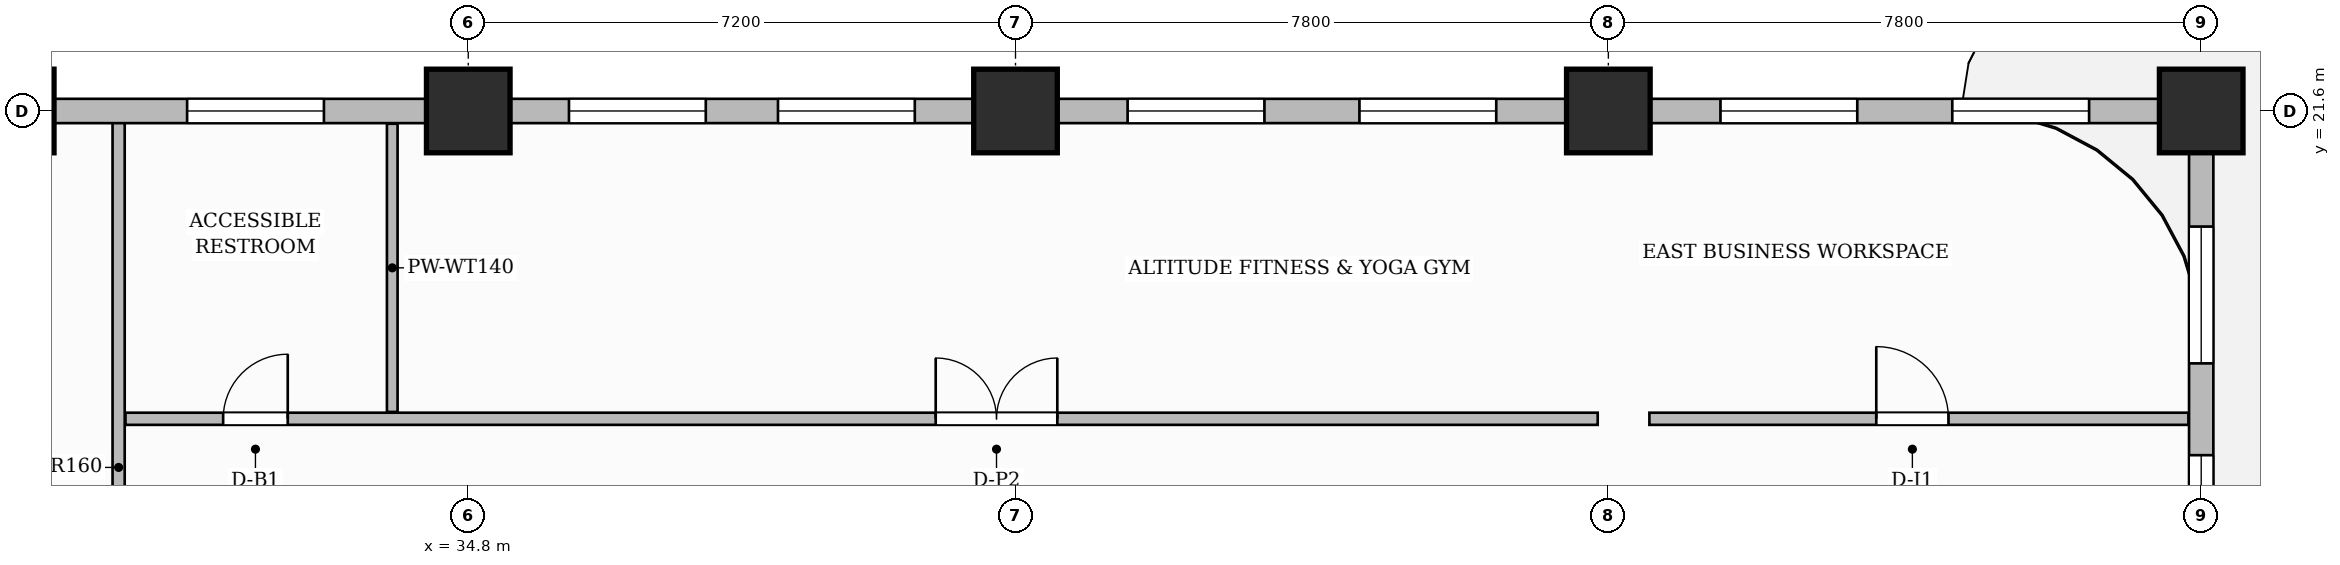
"""IFC4 building model, lengths in metres.
Left out: names, types, materials, properties, quantities, classifications, styles, units other than length and angle.
Written with IfcOpenShell. Run it as: python <this file> out.ifc"""

import sys

from ifc_helpers import new_model, si_unit, direction, frame, frame_2d, origin, origin_2d, place, context, subcontext, project, spatial, rectangle, extrude, source, transform, mapped, element, fill, save


model = new_model("IFC4")
c1 = context("Model", 3, precision=1e-05, world=origin(), true_north=direction((0.0, 1.0)))
c2 = subcontext(c1, "Body", "Model", "MODEL_VIEW")
j1 = project(units=[si_unit("LENGTHUNIT", "METRE"), si_unit("PLANEANGLEUNIT", "RADIAN")], contexts=[c1])
p1 = place(None, origin())
s1 = spatial("IfcSite", under=j1, at=p1, CompositionType="ELEMENT")
p2 = place(p1, origin())
s2 = spatial("IfcBuilding", under=s1, at=p2, CompositionType="ELEMENT")
p3 = place(p2, frame((0.0, 0.0, 54.6)))
s3 = spatial("IfcBuildingStorey", under=s2, at=p3, CompositionType="ELEMENT", Elevation=54.6)
m1 = source(origin(), c2, "Body", "SweptSolid", [
    extrude(rectangle(XDim=1.1, YDim=1.1, at=origin_2d()), origin(), (0.0, 0.0, 1.0), 3.7),
])
for number, where, z_axis, x_axis in (
    (1, (28.8, 21.6, 0.0), (0.0, 0.0, 1.0), (1.0, 0.0, 0.0)),
    (2, (34.8, 21.6, 0.0), (0.0, 0.0, 1.0), (1.0, 0.0, 0.0)),
    (3, (42.0, 21.6, 0.0), (0.0, 0.0, 1.0), (1.0, 0.0, 0.0)),
    (4, (49.8, 21.6, 0.0), (0.0, 0.0, 1.0), (1.0, 0.0, 0.0)),
    (5, (57.6, 21.6, 0.0), (0.0, 0.0, 1.0), (1.0, 0.0, 0.0)),
):
    element("IfcColumn", number, at=place(p3, frame(where, z_axis=z_axis, x_axis=x_axis)), inside=s3, PredefinedType="COLUMN", context=c2, shape_type="MappedRepresentation", body=[
        mapped(m1, transform((0.0, 0.0, 0.0), scale=1.0)),
    ])
p4 = place(p3, frame((30.2, 12.36, 0.0), z_axis=(0.0, 0.0, 1.0), x_axis=(0.0, 1.0, 0.0)))
e6 = element("IfcWall", 6, at=p4, inside=s3, PredefinedType="PARTITIONING", context=c2, shape_type="SweptSolid", body=[
    extrude(rectangle(XDim=9.1, YDim=0.16, at=frame_2d((4.55, 0.0))), origin(), (0.0, 0.0, 1.0), 3.45),
])
p5 = place(p3, frame((30.29, 17.55, 0.0), z_axis=(0.0, 0.0, 1.0), x_axis=(1.0, 0.0, 0.0)))
e7 = element("IfcWall", 7, at=p5, inside=s3, PredefinedType="PARTITIONING", context=c2, shape_type="SweptSolid", body=[
    extrude(rectangle(XDim=19.37, YDim=0.16, at=frame_2d((9.685, 0.0))), origin(), (0.0, 0.0, 1.0), 3.45),
])
p6 = place(p5, frame((1.285, 0.0, 0.0)))
e8 = element("IfcOpeningElement", 8, at=p6, cuts=e7, PredefinedType="OPENING", context=c2, shape_type="SweptSolid", body=[
    extrude(rectangle(XDim=0.85, YDim=2.1, at=frame_2d((0.425, 1.05))), frame((0.0, 0.09, 0.0), z_axis=(0.0, -1.0, 0.0), x_axis=(1.0, 0.0, 0.0)), (0.0, 0.0, 1.0), 0.18),
])
p7 = place(p5, frame((10.66, 0.0, 0.0)))
e9 = element("IfcOpeningElement", 9, at=p7, cuts=e7, PredefinedType="OPENING", context=c2, shape_type="SweptSolid", body=[
    extrude(rectangle(XDim=1.6, YDim=2.4, at=frame_2d((0.8, 1.2))), frame((0.0, 0.09, 0.0), z_axis=(0.0, -1.0, 0.0), x_axis=(1.0, 0.0, 0.0)), (0.0, 0.0, 1.0), 0.18),
])
p8 = place(p3, frame((50.34, 17.55, 0.0), z_axis=(0.0, 0.0, 1.0), x_axis=(1.0, 0.0, 0.0)))
e10 = element("IfcWall", 10, at=p8, inside=s3, PredefinedType="PARTITIONING", context=c2, shape_type="SweptSolid", body=[
    extrude(rectangle(XDim=7.092, YDim=0.16, at=frame_2d((3.546, 0.0))), origin(), (0.0, 0.0, 1.0), 3.45),
])
p9 = place(p8, frame((2.985, 0.0, 0.0)))
e11 = element("IfcOpeningElement", 11, at=p9, cuts=e10, PredefinedType="OPENING", context=c2, shape_type="SweptSolid", body=[
    extrude(rectangle(XDim=0.95, YDim=2.15, at=frame_2d((0.475, 1.075))), frame((0.0, 0.09, 0.0), z_axis=(0.0, -1.0, 0.0), x_axis=(1.0, 0.0, 0.0)), (0.0, 0.0, 1.0), 0.18),
])
p10 = place(p3, frame((33.8, 17.64, 0.0), z_axis=(0.0, 0.0, 1.0), x_axis=(0.0, 1.0, 0.0)))
e12 = element("IfcWall", 12, at=p10, inside=s3, PredefinedType="PARTITIONING", context=c2, shape_type="SweptSolid", body=[
    extrude(rectangle(XDim=3.792, YDim=0.14, at=frame_2d((1.896, 0.0))), origin(), (0.0, 0.0, 1.0), 3.45),
])
p11 = place(p3, frame((57.6, 0.05, 0.0), z_axis=(0.0, 0.0, 1.0), x_axis=(0.0, 1.0, 0.0)))
e13 = element("IfcWall", 13, at=p11, inside=s3, PredefinedType="SOLIDWALL", context=c2, shape_type="SweptSolid", body=[
    extrude(rectangle(XDim=21.5, YDim=0.32, at=frame_2d((10.75, 0.0))), origin(), (0.0, 0.0, 1.0), 2.885),
])
p12 = place(p11, frame((3.072, 0.0, 0.0)))
e14 = element("IfcOpeningElement", 14, at=p12, cuts=e13, PredefinedType="OPENING", context=c2, shape_type="SweptSolid", body=[
    extrude(rectangle(XDim=1.2, YDim=2.2, at=frame_2d((0.6, 1.1))), frame((0.0, 0.17, 0.0), z_axis=(0.0, -1.0, 0.0), x_axis=(1.0, 0.0, 0.0)), (0.0, 0.0, 1.0), 0.34),
])
p13 = place(p11, frame((1.061, 0.0, 0.8)))
e15 = element("IfcOpeningElement", 15, at=p13, cuts=e13, PredefinedType="OPENING", context=c2, shape_type="SweptSolid", body=[
    extrude(rectangle(XDim=1.4, YDim=1.85, at=frame_2d((0.7, 0.925))), frame((0.0, 0.17, 0.0), z_axis=(0.0, -1.0, 0.0), x_axis=(1.0, 0.0, 0.0)), (0.0, 0.0, 1.0), 0.34),
])
p14 = place(p11, frame((4.886, 0.0, 0.8)))
e16 = element("IfcOpeningElement", 16, at=p14, cuts=e13, PredefinedType="OPENING", context=c2, shape_type="SweptSolid", body=[
    extrude(rectangle(XDim=1.15, YDim=1.8, at=frame_2d((0.575, 0.9))), frame((0.0, 0.17, 0.0), z_axis=(0.0, -1.0, 0.0), x_axis=(1.0, 0.0, 0.0)), (0.0, 0.0, 1.0), 0.34),
])
p15 = place(p11, frame((10.454, 0.0, 0.8)))
e17 = element("IfcOpeningElement", 17, at=p15, cuts=e13, PredefinedType="OPENING", context=c2, shape_type="SweptSolid", body=[
    extrude(rectangle(XDim=1.8, YDim=1.85, at=frame_2d((0.9, 0.925))), frame((0.0, 0.17, 0.0), z_axis=(0.0, -1.0, 0.0), x_axis=(1.0, 0.0, 0.0)), (0.0, 0.0, 1.0), 0.34),
])
p16 = place(p11, frame((15.621, 0.0, 0.8)))
e18 = element("IfcOpeningElement", 18, at=p16, cuts=e13, PredefinedType="OPENING", context=c2, shape_type="SweptSolid", body=[
    extrude(rectangle(XDim=1.4, YDim=1.85, at=frame_2d((0.7, 0.925))), frame((0.0, 0.17, 0.0), z_axis=(0.0, -1.0, 0.0), x_axis=(1.0, 0.0, 0.0)), (0.0, 0.0, 1.0), 0.34),
])
p17 = place(p11, frame((18.229, 0.0, 0.8)))
e19 = element("IfcOpeningElement", 19, at=p17, cuts=e13, PredefinedType="OPENING", context=c2, shape_type="SweptSolid", body=[
    extrude(rectangle(XDim=1.8, YDim=1.85, at=frame_2d((0.9, 0.925))), frame((0.0, 0.17, 0.0), z_axis=(0.0, -1.0, 0.0), x_axis=(1.0, 0.0, 0.0)), (0.0, 0.0, 1.0), 0.34),
])
p18 = place(p3, frame((14.4, 21.6, 0.0), z_axis=(0.0, 0.0, 1.0), x_axis=(1.0, 0.0, 0.0)))
e20 = element("IfcWall", 20, at=p18, inside=s3, PredefinedType="SOLIDWALL", context=c2, shape_type="SweptSolid", body=[
    extrude(rectangle(XDim=43.2, YDim=0.32, at=frame_2d((21.6, 0.0))), origin(), (0.0, 0.0, 1.0), 2.885),
])
p19 = place(p18, frame((1.5, 0.0, 0.0)))
e21 = element("IfcOpeningElement", 21, at=p19, cuts=e20, PredefinedType="OPENING", context=c2, shape_type="SweptSolid", body=[
    extrude(rectangle(XDim=1.2, YDim=2.2, at=frame_2d((0.6, 1.1))), frame((0.0, 0.17, 0.0), z_axis=(0.0, -1.0, 0.0), x_axis=(1.0, 0.0, 0.0)), (0.0, 0.0, 1.0), 0.34),
])
p20 = place(p18, frame((3.321, 0.0, 0.8)))
e22 = element("IfcOpeningElement", 22, at=p20, cuts=e20, PredefinedType="OPENING", context=c2, shape_type="SweptSolid", body=[
    extrude(rectangle(XDim=1.15, YDim=1.8, at=frame_2d((0.575, 0.9))), frame((0.0, 0.17, 0.0), z_axis=(0.0, -1.0, 0.0), x_axis=(1.0, 0.0, 0.0)), (0.0, 0.0, 1.0), 0.34),
])
p21 = place(p18, frame((5.129, 0.0, 0.8)))
e23 = element("IfcOpeningElement", 23, at=p21, cuts=e20, PredefinedType="OPENING", context=c2, shape_type="SweptSolid", body=[
    extrude(rectangle(XDim=0.95, YDim=1.75, at=frame_2d((0.475, 0.875))), frame((0.0, 0.17, 0.0), z_axis=(0.0, -1.0, 0.0), x_axis=(1.0, 0.0, 0.0)), (0.0, 0.0, 1.0), 0.34),
])
p22 = place(p18, frame((8.496, 0.0, 0.8)))
e24 = element("IfcOpeningElement", 24, at=p22, cuts=e20, PredefinedType="OPENING", context=c2, shape_type="SweptSolid", body=[
    extrude(rectangle(XDim=1.4, YDim=1.85, at=frame_2d((0.7, 0.925))), frame((0.0, 0.17, 0.0), z_axis=(0.0, -1.0, 0.0), x_axis=(1.0, 0.0, 0.0)), (0.0, 0.0, 1.0), 0.34),
])
p23 = place(p18, frame((11.104, 0.0, 0.8)))
e25 = element("IfcOpeningElement", 25, at=p23, cuts=e20, PredefinedType="OPENING", context=c2, shape_type="SweptSolid", body=[
    extrude(rectangle(XDim=1.8, YDim=1.85, at=frame_2d((0.9, 0.925))), frame((0.0, 0.17, 0.0), z_axis=(0.0, -1.0, 0.0), x_axis=(1.0, 0.0, 0.0)), (0.0, 0.0, 1.0), 0.34),
])
p24 = place(p18, frame((16.701, 0.0, 0.8)))
e26 = element("IfcOpeningElement", 26, at=p24, cuts=e20, PredefinedType="OPENING", context=c2, shape_type="SweptSolid", body=[
    extrude(rectangle(XDim=1.8, YDim=1.85, at=frame_2d((0.9, 0.925))), frame((0.0, 0.17, 0.0), z_axis=(0.0, -1.0, 0.0), x_axis=(1.0, 0.0, 0.0)), (0.0, 0.0, 1.0), 0.34),
])
p25 = place(p18, frame((21.725, 0.0, 0.8)))
e27 = element("IfcOpeningElement", 27, at=p25, cuts=e20, PredefinedType="OPENING", context=c2, shape_type="SweptSolid", body=[
    extrude(rectangle(XDim=1.8, YDim=1.85, at=frame_2d((0.9, 0.925))), frame((0.0, 0.17, 0.0), z_axis=(0.0, -1.0, 0.0), x_axis=(1.0, 0.0, 0.0)), (0.0, 0.0, 1.0), 0.34),
])
p26 = place(p18, frame((24.475, 0.0, 0.8)))
e28 = element("IfcOpeningElement", 28, at=p26, cuts=e20, PredefinedType="OPENING", context=c2, shape_type="SweptSolid", body=[
    extrude(rectangle(XDim=1.8, YDim=1.85, at=frame_2d((0.9, 0.925))), frame((0.0, 0.17, 0.0), z_axis=(0.0, -1.0, 0.0), x_axis=(1.0, 0.0, 0.0)), (0.0, 0.0, 1.0), 0.34),
])
p27 = place(p18, frame((29.075, 0.0, 0.8)))
e29 = element("IfcOpeningElement", 29, at=p27, cuts=e20, PredefinedType="OPENING", context=c2, shape_type="SweptSolid", body=[
    extrude(rectangle(XDim=1.8, YDim=1.85, at=frame_2d((0.9, 0.925))), frame((0.0, 0.17, 0.0), z_axis=(0.0, -1.0, 0.0), x_axis=(1.0, 0.0, 0.0)), (0.0, 0.0, 1.0), 0.34),
])
p28 = place(p18, frame((32.125, 0.0, 0.8)))
e30 = element("IfcOpeningElement", 30, at=p28, cuts=e20, PredefinedType="OPENING", context=c2, shape_type="SweptSolid", body=[
    extrude(rectangle(XDim=1.8, YDim=1.85, at=frame_2d((0.9, 0.925))), frame((0.0, 0.17, 0.0), z_axis=(0.0, -1.0, 0.0), x_axis=(1.0, 0.0, 0.0)), (0.0, 0.0, 1.0), 0.34),
])
p29 = place(p18, frame((36.875, 0.0, 0.8)))
e31 = element("IfcOpeningElement", 31, at=p29, cuts=e20, PredefinedType="OPENING", context=c2, shape_type="SweptSolid", body=[
    extrude(rectangle(XDim=1.8, YDim=1.85, at=frame_2d((0.9, 0.925))), frame((0.0, 0.17, 0.0), z_axis=(0.0, -1.0, 0.0), x_axis=(1.0, 0.0, 0.0)), (0.0, 0.0, 1.0), 0.34),
])
p30 = place(p18, frame((39.925, 0.0, 0.8)))
e32 = element("IfcOpeningElement", 32, at=p30, cuts=e20, PredefinedType="OPENING", context=c2, shape_type="SweptSolid", body=[
    extrude(rectangle(XDim=1.8, YDim=1.85, at=frame_2d((0.9, 0.925))), frame((0.0, 0.17, 0.0), z_axis=(0.0, -1.0, 0.0), x_axis=(1.0, 0.0, 0.0)), (0.0, 0.0, 1.0), 0.34),
])
m2 = source(origin(), c2, "Body", "SweptSolid", [
    extrude(rectangle(XDim=0.95, YDim=2.15, at=frame_2d((0.475, 1.075))), frame((0.0, 0.025, 0.0), z_axis=(0.0, -1.0, 0.0), x_axis=(1.0, 0.0, 0.0)), (0.0, 0.0, 1.0), 0.05),
])
p31 = place(p9, origin())
e33 = element("IfcDoor", 33, at=p31, inside=s3, OperationType="SINGLE_SWING_LEFT", PredefinedType="DOOR", context=c2, shape_type="MappedRepresentation", body=[
    mapped(m2, transform((0.0, 0.0, 0.0), scale=1.0)),
])
fill(e11, e33)
m3 = source(origin(), c2, "Body", "SweptSolid", [
    extrude(rectangle(XDim=0.85, YDim=2.1, at=frame_2d((0.425, 1.05))), frame((0.0, 0.025, 0.0), z_axis=(0.0, -1.0, 0.0), x_axis=(1.0, 0.0, 0.0)), (0.0, 0.0, 1.0), 0.05),
])
p32 = place(p6, origin())
e34 = element("IfcDoor", 34, at=p32, inside=s3, OperationType="SINGLE_SWING_RIGHT", PredefinedType="DOOR", context=c2, shape_type="MappedRepresentation", body=[
    mapped(m3, transform((0.0, 0.0, 0.0), scale=1.0)),
])
fill(e8, e34)
m4 = source(origin(), c2, "Body", "SweptSolid", [
    extrude(rectangle(XDim=1.6, YDim=2.4, at=frame_2d((0.8, 1.2))), frame((0.0, 0.025, 0.0), z_axis=(0.0, -1.0, 0.0), x_axis=(1.0, 0.0, 0.0)), (0.0, 0.0, 1.0), 0.05),
])
p33 = place(p7, origin())
e35 = element("IfcDoor", 35, at=p33, inside=s3, OperationType="DOUBLE_DOOR_SINGLE_SWING", PredefinedType="DOOR", context=c2, shape_type="MappedRepresentation", body=[
    mapped(m4, transform((0.0, 0.0, 0.0), scale=1.0)),
])
fill(e9, e35)
m5 = source(origin(), c2, "Body", "SweptSolid", [
    extrude(rectangle(XDim=1.4, YDim=1.85, at=frame_2d((0.7, 0.925))), frame((0.0, 0.03, 0.0), z_axis=(0.0, -1.0, 0.0), x_axis=(1.0, 0.0, 0.0)), (0.0, 0.0, 1.0), 0.06),
])
p34 = place(p16, origin())
e36 = element("IfcWindow", 36, at=p34, inside=s3, PartitioningType="SINGLE_PANEL", PredefinedType="WINDOW", context=c2, shape_type="MappedRepresentation", body=[
    mapped(m5, transform((0.0, 0.0, 0.0), scale=1.0)),
])
fill(e18, e36)
m6 = source(origin(), c2, "Body", "SweptSolid", [
    extrude(rectangle(XDim=1.8, YDim=1.85, at=frame_2d((0.9, 0.925))), frame((0.0, 0.03, 0.0), z_axis=(0.0, -1.0, 0.0), x_axis=(1.0, 0.0, 0.0)), (0.0, 0.0, 1.0), 0.06),
])
p35 = place(p17, origin())
e37 = element("IfcWindow", 37, at=p35, inside=s3, PartitioningType="DOUBLE_PANEL_VERTICAL", PredefinedType="WINDOW", context=c2, shape_type="MappedRepresentation", body=[
    mapped(m6, transform((0.0, 0.0, 0.0), scale=1.0)),
])
fill(e19, e37)
p36 = place(p24, origin())
e38 = element("IfcWindow", 38, at=p36, inside=s3, PartitioningType="DOUBLE_PANEL_VERTICAL", PredefinedType="WINDOW", context=c2, shape_type="MappedRepresentation", body=[
    mapped(m6, transform((0.0, 0.0, 0.0), scale=1.0)),
])
fill(e26, e38)
p37 = place(p25, origin())
e39 = element("IfcWindow", 39, at=p37, inside=s3, PartitioningType="DOUBLE_PANEL_VERTICAL", PredefinedType="WINDOW", context=c2, shape_type="MappedRepresentation", body=[
    mapped(m6, transform((0.0, 0.0, 0.0), scale=1.0)),
])
fill(e27, e39)
p38 = place(p26, origin())
e40 = element("IfcWindow", 40, at=p38, inside=s3, PartitioningType="DOUBLE_PANEL_VERTICAL", PredefinedType="WINDOW", context=c2, shape_type="MappedRepresentation", body=[
    mapped(m6, transform((0.0, 0.0, 0.0), scale=1.0)),
])
fill(e28, e40)
p39 = place(p27, origin())
e41 = element("IfcWindow", 41, at=p39, inside=s3, PartitioningType="DOUBLE_PANEL_VERTICAL", PredefinedType="WINDOW", context=c2, shape_type="MappedRepresentation", body=[
    mapped(m6, transform((0.0, 0.0, 0.0), scale=1.0)),
])
fill(e29, e41)
p40 = place(p28, origin())
e42 = element("IfcWindow", 42, at=p40, inside=s3, PartitioningType="DOUBLE_PANEL_VERTICAL", PredefinedType="WINDOW", context=c2, shape_type="MappedRepresentation", body=[
    mapped(m6, transform((0.0, 0.0, 0.0), scale=1.0)),
])
fill(e30, e42)
p41 = place(p29, origin())
e43 = element("IfcWindow", 43, at=p41, inside=s3, PartitioningType="DOUBLE_PANEL_VERTICAL", PredefinedType="WINDOW", context=c2, shape_type="MappedRepresentation", body=[
    mapped(m6, transform((0.0, 0.0, 0.0), scale=1.0)),
])
fill(e31, e43)
p42 = place(p30, origin())
e44 = element("IfcWindow", 44, at=p42, inside=s3, PartitioningType="DOUBLE_PANEL_VERTICAL", PredefinedType="WINDOW", context=c2, shape_type="MappedRepresentation", body=[
    mapped(m6, transform((0.0, 0.0, 0.0), scale=1.0)),
])
fill(e32, e44)
save(model, sys.argv[1])
